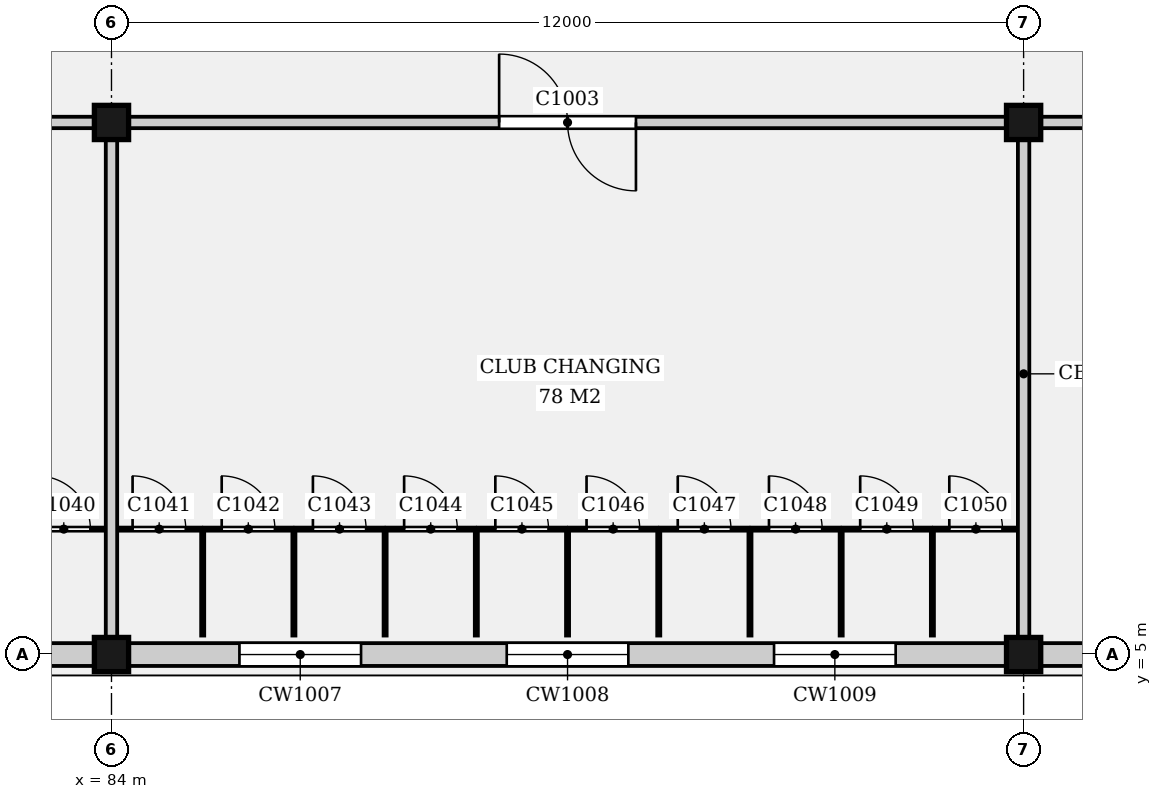
"""IFC4 building model, lengths in metres.
Left out: names, types, materials, properties, quantities, classifications, styles, units other than length and angle.
Written with IfcOpenShell. Run it as: python <this file> out.ifc"""

import sys

from ifc_helpers import new_model, si_unit, direction, frame, frame_2d, origin, origin_2d, place, context, subcontext, project, spatial, rectangle, extrude, element, fill, save


model = new_model("IFC4")
c1 = context("Model", 3, precision=1e-05, world=origin(), true_north=direction((0.0, 1.0)))
c2 = subcontext(c1, "Body", "Model", "MODEL_VIEW")
j1 = project(units=[si_unit("LENGTHUNIT", "METRE"), si_unit("PLANEANGLEUNIT", "RADIAN")], contexts=[c1])
p1 = place(None, origin())
s1 = spatial("IfcSite", under=j1, at=p1, CompositionType="ELEMENT")
p2 = place(p1, origin())
s2 = spatial("IfcBuilding", under=s1, at=p2, CompositionType="ELEMENT")
p3 = place(p2, frame((0.0, 0.0, 5.0)))
s3 = spatial("IfcBuildingStorey", under=s2, at=p3, CompositionType="ELEMENT", Elevation=5.0)
for number, where, z_axis, x_axis in (
    (1, (84.0, 5.0, 0.0), (0.0, 0.0, 1.0), (1.0, 0.0, 0.0)),
    (2, (84.0, 12.0, 0.0), (0.0, 0.0, 1.0), (1.0, 0.0, 0.0)),
    (3, (96.0, 5.0, 0.0), (0.0, 0.0, 1.0), (1.0, 0.0, 0.0)),
    (4, (96.0, 12.0, 0.0), (0.0, 0.0, 1.0), (1.0, 0.0, 0.0)),
):
    element("IfcColumn", number, at=place(p3, frame(where, z_axis=z_axis, x_axis=x_axis)), inside=s3, PredefinedType="COLUMN", context=c2, shape_type="SweptSolid", body=[
        extrude(rectangle(XDim=0.45, YDim=0.45, at=origin_2d()), origin(), (0.0, 0.0, 1.0), 4.4),
    ])
p4 = place(p3, frame((72.225, 5.0, 0.0), z_axis=(0.0, 0.0, 1.0), x_axis=(1.0, 0.0, 0.0)))
e5 = element("IfcWall", 5, at=p4, inside=s3, PredefinedType="ELEMENTEDWALL", context=c2, shape_type="SweptSolid", body=[
    extrude(rectangle(XDim=11.55, YDim=0.3, at=frame_2d((5.775, 0.0))), origin(), (0.0, 0.0, 1.0), 3.98),
])
p5 = place(p4, frame((1.458, 0.0, 1.4)))
e6 = element("IfcOpeningElement", 6, at=p5, cuts=e5, PredefinedType="OPENING", context=c2, shape_type="SweptSolid", body=[
    extrude(rectangle(XDim=1.6, YDim=1.2, at=frame_2d((0.8, 0.6))), frame((0.0, 0.16, 0.0), z_axis=(0.0, -1.0, 0.0), x_axis=(1.0, 0.0, 0.0)), (0.0, 0.0, 1.0), 0.32),
])
p6 = place(p4, frame((4.975, 0.0, 1.4)))
e7 = element("IfcOpeningElement", 7, at=p6, cuts=e5, PredefinedType="OPENING", context=c2, shape_type="SweptSolid", body=[
    extrude(rectangle(XDim=1.6, YDim=1.2, at=frame_2d((0.8, 0.6))), frame((0.0, 0.16, 0.0), z_axis=(0.0, -1.0, 0.0), x_axis=(1.0, 0.0, 0.0)), (0.0, 0.0, 1.0), 0.32),
])
p7 = place(p4, frame((8.492, 0.0, 1.4)))
e8 = element("IfcOpeningElement", 8, at=p7, cuts=e5, PredefinedType="OPENING", context=c2, shape_type="SweptSolid", body=[
    extrude(rectangle(XDim=1.6, YDim=1.2, at=frame_2d((0.8, 0.6))), frame((0.0, 0.16, 0.0), z_axis=(0.0, -1.0, 0.0), x_axis=(1.0, 0.0, 0.0)), (0.0, 0.0, 1.0), 0.32),
])
p8 = place(p3, frame((84.225, 5.0, 0.0), z_axis=(0.0, 0.0, 1.0), x_axis=(1.0, 0.0, 0.0)))
e9 = element("IfcWall", 9, at=p8, inside=s3, PredefinedType="ELEMENTEDWALL", context=c2, shape_type="SweptSolid", body=[
    extrude(rectangle(XDim=11.55, YDim=0.3, at=frame_2d((5.775, 0.0))), origin(), (0.0, 0.0, 1.0), 3.98),
])
p9 = place(p8, frame((1.458, 0.0, 1.4)))
e10 = element("IfcOpeningElement", 10, at=p9, cuts=e9, PredefinedType="OPENING", context=c2, shape_type="SweptSolid", body=[
    extrude(rectangle(XDim=1.6, YDim=1.2, at=frame_2d((0.8, 0.6))), frame((0.0, 0.16, 0.0), z_axis=(0.0, -1.0, 0.0), x_axis=(1.0, 0.0, 0.0)), (0.0, 0.0, 1.0), 0.32),
])
p10 = place(p8, frame((4.975, 0.0, 1.4)))
e11 = element("IfcOpeningElement", 11, at=p10, cuts=e9, PredefinedType="OPENING", context=c2, shape_type="SweptSolid", body=[
    extrude(rectangle(XDim=1.6, YDim=1.2, at=frame_2d((0.8, 0.6))), frame((0.0, 0.16, 0.0), z_axis=(0.0, -1.0, 0.0), x_axis=(1.0, 0.0, 0.0)), (0.0, 0.0, 1.0), 0.32),
])
p11 = place(p8, frame((8.492, 0.0, 1.4)))
e12 = element("IfcOpeningElement", 12, at=p11, cuts=e9, PredefinedType="OPENING", context=c2, shape_type="SweptSolid", body=[
    extrude(rectangle(XDim=1.6, YDim=1.2, at=frame_2d((0.8, 0.6))), frame((0.0, 0.16, 0.0), z_axis=(0.0, -1.0, 0.0), x_axis=(1.0, 0.0, 0.0)), (0.0, 0.0, 1.0), 0.32),
])
p12 = place(p3, frame((96.225, 5.0, 0.0), z_axis=(0.0, 0.0, 1.0), x_axis=(1.0, 0.0, 0.0)))
e13 = element("IfcWall", 13, at=p12, inside=s3, PredefinedType="ELEMENTEDWALL", context=c2, shape_type="SweptSolid", body=[
    extrude(rectangle(XDim=11.55, YDim=0.3, at=frame_2d((5.775, 0.0))), origin(), (0.0, 0.0, 1.0), 3.98),
])
p13 = place(p12, frame((1.458, 0.0, 1.4)))
e14 = element("IfcOpeningElement", 14, at=p13, cuts=e13, PredefinedType="OPENING", context=c2, shape_type="SweptSolid", body=[
    extrude(rectangle(XDim=1.6, YDim=1.2, at=frame_2d((0.8, 0.6))), frame((0.0, 0.16, 0.0), z_axis=(0.0, -1.0, 0.0), x_axis=(1.0, 0.0, 0.0)), (0.0, 0.0, 1.0), 0.32),
])
p14 = place(p12, frame((4.975, 0.0, 1.4)))
e15 = element("IfcOpeningElement", 15, at=p14, cuts=e13, PredefinedType="OPENING", context=c2, shape_type="SweptSolid", body=[
    extrude(rectangle(XDim=1.6, YDim=1.2, at=frame_2d((0.8, 0.6))), frame((0.0, 0.16, 0.0), z_axis=(0.0, -1.0, 0.0), x_axis=(1.0, 0.0, 0.0)), (0.0, 0.0, 1.0), 0.32),
])
p15 = place(p12, frame((8.492, 0.0, 1.4)))
e16 = element("IfcOpeningElement", 16, at=p15, cuts=e13, PredefinedType="OPENING", context=c2, shape_type="SweptSolid", body=[
    extrude(rectangle(XDim=1.6, YDim=1.2, at=frame_2d((0.8, 0.6))), frame((0.0, 0.16, 0.0), z_axis=(0.0, -1.0, 0.0), x_axis=(1.0, 0.0, 0.0)), (0.0, 0.0, 1.0), 0.32),
])
p16 = place(p3, frame((72.225, 12.0, 0.0), z_axis=(0.0, 0.0, 1.0), x_axis=(1.0, 0.0, 0.0)))
e17 = element("IfcWall", 17, at=p16, inside=s3, PredefinedType="PARTITIONING", context=c2, shape_type="SweptSolid", body=[
    extrude(rectangle(XDim=11.55, YDim=0.15, at=frame_2d((5.775, 0.0))), origin(), (0.0, 0.0, 1.0), 3.98),
])
p17 = place(p16, frame((4.875, 0.0, 0.0)))
e18 = element("IfcOpeningElement", 18, at=p17, cuts=e17, PredefinedType="OPENING", context=c2, shape_type="SweptSolid", body=[
    extrude(rectangle(XDim=1.8, YDim=2.4, at=frame_2d((0.9, 1.2))), frame((0.0, 0.085, 0.0), z_axis=(0.0, -1.0, 0.0), x_axis=(1.0, 0.0, 0.0)), (0.0, 0.0, 1.0), 0.17),
])
p18 = place(p3, frame((84.225, 12.0, 0.0), z_axis=(0.0, 0.0, 1.0), x_axis=(1.0, 0.0, 0.0)))
e19 = element("IfcWall", 19, at=p18, inside=s3, PredefinedType="PARTITIONING", context=c2, shape_type="SweptSolid", body=[
    extrude(rectangle(XDim=11.55, YDim=0.15, at=frame_2d((5.775, 0.0))), origin(), (0.0, 0.0, 1.0), 3.98),
])
p19 = place(p18, frame((4.875, 0.0, 0.0)))
e20 = element("IfcOpeningElement", 20, at=p19, cuts=e19, PredefinedType="OPENING", context=c2, shape_type="SweptSolid", body=[
    extrude(rectangle(XDim=1.8, YDim=2.4, at=frame_2d((0.9, 1.2))), frame((0.0, 0.085, 0.0), z_axis=(0.0, -1.0, 0.0), x_axis=(1.0, 0.0, 0.0)), (0.0, 0.0, 1.0), 0.17),
])
p20 = place(p3, frame((96.225, 12.0, 0.0), z_axis=(0.0, 0.0, 1.0), x_axis=(1.0, 0.0, 0.0)))
e21 = element("IfcWall", 21, at=p20, inside=s3, PredefinedType="PARTITIONING", context=c2, shape_type="SweptSolid", body=[
    extrude(rectangle(XDim=11.55, YDim=0.15, at=frame_2d((5.775, 0.0))), origin(), (0.0, 0.0, 1.0), 3.98),
])
p21 = place(p20, frame((5.275, 0.0, 0.0)))
e22 = element("IfcOpeningElement", 22, at=p21, cuts=e21, PredefinedType="OPENING", context=c2, shape_type="SweptSolid", body=[
    extrude(rectangle(XDim=1.0, YDim=2.1, at=frame_2d((0.5, 1.05))), frame((0.0, 0.085, 0.0), z_axis=(0.0, -1.0, 0.0), x_axis=(1.0, 0.0, 0.0)), (0.0, 0.0, 1.0), 0.17),
])
for number, where, z_axis, x_axis in (
    (23, (84.0, 5.225, 0.0), (0.0, 0.0, 1.0), (0.0, 1.0, 0.0)),
    (24, (96.0, 5.225, 0.0), (0.0, 0.0, 1.0), (0.0, 1.0, 0.0)),
):
    element("IfcWall", number, at=place(p3, frame(where, z_axis=z_axis, x_axis=x_axis)), inside=s3, PredefinedType="PARTITIONING", context=c2, shape_type="SweptSolid", body=[
        extrude(rectangle(XDim=6.55, YDim=0.15, at=frame_2d((3.275, 0.0))), origin(), (0.0, 0.0, 1.0), 3.98),
    ])
for number, where, z_axis, x_axis in (
    (25, (85.2, 5.25, 0.0), (0.0, 0.0, 1.0), (0.0, 1.0, 0.0)),
    (26, (86.4, 5.25, 0.0), (0.0, 0.0, 1.0), (0.0, 1.0, 0.0)),
    (27, (87.6, 5.25, 0.0), (0.0, 0.0, 1.0), (0.0, 1.0, 0.0)),
    (28, (88.8, 5.25, 0.0), (0.0, 0.0, 1.0), (0.0, 1.0, 0.0)),
    (29, (90.0, 5.25, 0.0), (0.0, 0.0, 1.0), (0.0, 1.0, 0.0)),
    (30, (91.2, 5.25, 0.0), (0.0, 0.0, 1.0), (0.0, 1.0, 0.0)),
    (31, (92.4, 5.25, 0.0), (0.0, 0.0, 1.0), (0.0, 1.0, 0.0)),
    (32, (93.6, 5.25, 0.0), (0.0, 0.0, 1.0), (0.0, 1.0, 0.0)),
    (33, (94.8, 5.25, 0.0), (0.0, 0.0, 1.0), (0.0, 1.0, 0.0)),
):
    element("IfcWall", number, at=place(p3, frame(where, z_axis=z_axis, x_axis=x_axis)), inside=s3, PredefinedType="PARTITIONING", context=c2, shape_type="SweptSolid", body=[
        extrude(rectangle(XDim=1.4, YDim=0.04, at=frame_2d((0.7, 0.0))), origin(), (0.0, 0.0, 1.0), 2.4),
    ])
p22 = place(p3, frame((82.82, 6.65, 0.0), z_axis=(0.0, 0.0, 1.0), x_axis=(1.0, 0.0, 0.0)))
e34 = element("IfcWall", 34, at=p22, inside=s3, PredefinedType="PARTITIONING", context=c2, shape_type="SweptSolid", body=[
    extrude(rectangle(XDim=1.105, YDim=0.04, at=frame_2d((0.552, 0.0))), origin(), (0.0, 0.0, 1.0), 2.4),
])
p23 = place(p22, frame((0.202, 0.0, 0.0)))
e35 = element("IfcOpeningElement", 35, at=p23, cuts=e34, PredefinedType="OPENING", context=c2, shape_type="SweptSolid", body=[
    extrude(rectangle(XDim=0.7, YDim=2.0, at=frame_2d((0.35, 1.0))), frame((0.0, 0.03, 0.0), z_axis=(0.0, -1.0, 0.0), x_axis=(1.0, 0.0, 0.0)), (0.0, 0.0, 1.0), 0.06),
])
p24 = place(p3, frame((84.075, 6.65, 0.0), z_axis=(0.0, 0.0, 1.0), x_axis=(1.0, 0.0, 0.0)))
e36 = element("IfcWall", 36, at=p24, inside=s3, PredefinedType="PARTITIONING", context=c2, shape_type="SweptSolid", body=[
    extrude(rectangle(XDim=1.105, YDim=0.04, at=frame_2d((0.552, 0.0))), origin(), (0.0, 0.0, 1.0), 2.4),
])
p25 = place(p24, frame((0.202, 0.0, 0.0)))
e37 = element("IfcOpeningElement", 37, at=p25, cuts=e36, PredefinedType="OPENING", context=c2, shape_type="SweptSolid", body=[
    extrude(rectangle(XDim=0.7, YDim=2.0, at=frame_2d((0.35, 1.0))), frame((0.0, 0.03, 0.0), z_axis=(0.0, -1.0, 0.0), x_axis=(1.0, 0.0, 0.0)), (0.0, 0.0, 1.0), 0.06),
])
p26 = place(p3, frame((85.22, 6.65, 0.0), z_axis=(0.0, 0.0, 1.0), x_axis=(1.0, 0.0, 0.0)))
e38 = element("IfcWall", 38, at=p26, inside=s3, PredefinedType="PARTITIONING", context=c2, shape_type="SweptSolid", body=[
    extrude(rectangle(XDim=1.16, YDim=0.04, at=frame_2d((0.58, 0.0))), origin(), (0.0, 0.0, 1.0), 2.4),
])
p27 = place(p26, frame((0.23, 0.0, 0.0)))
e39 = element("IfcOpeningElement", 39, at=p27, cuts=e38, PredefinedType="OPENING", context=c2, shape_type="SweptSolid", body=[
    extrude(rectangle(XDim=0.7, YDim=2.0, at=frame_2d((0.35, 1.0))), frame((0.0, 0.03, 0.0), z_axis=(0.0, -1.0, 0.0), x_axis=(1.0, 0.0, 0.0)), (0.0, 0.0, 1.0), 0.06),
])
p28 = place(p3, frame((86.42, 6.65, 0.0), z_axis=(0.0, 0.0, 1.0), x_axis=(1.0, 0.0, 0.0)))
e40 = element("IfcWall", 40, at=p28, inside=s3, PredefinedType="PARTITIONING", context=c2, shape_type="SweptSolid", body=[
    extrude(rectangle(XDim=1.16, YDim=0.04, at=frame_2d((0.58, 0.0))), origin(), (0.0, 0.0, 1.0), 2.4),
])
p29 = place(p28, frame((0.23, 0.0, 0.0)))
e41 = element("IfcOpeningElement", 41, at=p29, cuts=e40, PredefinedType="OPENING", context=c2, shape_type="SweptSolid", body=[
    extrude(rectangle(XDim=0.7, YDim=2.0, at=frame_2d((0.35, 1.0))), frame((0.0, 0.03, 0.0), z_axis=(0.0, -1.0, 0.0), x_axis=(1.0, 0.0, 0.0)), (0.0, 0.0, 1.0), 0.06),
])
p30 = place(p3, frame((87.62, 6.65, 0.0), z_axis=(0.0, 0.0, 1.0), x_axis=(1.0, 0.0, 0.0)))
e42 = element("IfcWall", 42, at=p30, inside=s3, PredefinedType="PARTITIONING", context=c2, shape_type="SweptSolid", body=[
    extrude(rectangle(XDim=1.16, YDim=0.04, at=frame_2d((0.58, 0.0))), origin(), (0.0, 0.0, 1.0), 2.4),
])
p31 = place(p30, frame((0.23, 0.0, 0.0)))
e43 = element("IfcOpeningElement", 43, at=p31, cuts=e42, PredefinedType="OPENING", context=c2, shape_type="SweptSolid", body=[
    extrude(rectangle(XDim=0.7, YDim=2.0, at=frame_2d((0.35, 1.0))), frame((0.0, 0.03, 0.0), z_axis=(0.0, -1.0, 0.0), x_axis=(1.0, 0.0, 0.0)), (0.0, 0.0, 1.0), 0.06),
])
p32 = place(p3, frame((88.82, 6.65, 0.0), z_axis=(0.0, 0.0, 1.0), x_axis=(1.0, 0.0, 0.0)))
e44 = element("IfcWall", 44, at=p32, inside=s3, PredefinedType="PARTITIONING", context=c2, shape_type="SweptSolid", body=[
    extrude(rectangle(XDim=1.16, YDim=0.04, at=frame_2d((0.58, 0.0))), origin(), (0.0, 0.0, 1.0), 2.4),
])
p33 = place(p32, frame((0.23, 0.0, 0.0)))
e45 = element("IfcOpeningElement", 45, at=p33, cuts=e44, PredefinedType="OPENING", context=c2, shape_type="SweptSolid", body=[
    extrude(rectangle(XDim=0.7, YDim=2.0, at=frame_2d((0.35, 1.0))), frame((0.0, 0.03, 0.0), z_axis=(0.0, -1.0, 0.0), x_axis=(1.0, 0.0, 0.0)), (0.0, 0.0, 1.0), 0.06),
])
p34 = place(p3, frame((90.02, 6.65, 0.0), z_axis=(0.0, 0.0, 1.0), x_axis=(1.0, 0.0, 0.0)))
e46 = element("IfcWall", 46, at=p34, inside=s3, PredefinedType="PARTITIONING", context=c2, shape_type="SweptSolid", body=[
    extrude(rectangle(XDim=1.16, YDim=0.04, at=frame_2d((0.58, 0.0))), origin(), (0.0, 0.0, 1.0), 2.4),
])
p35 = place(p34, frame((0.23, 0.0, 0.0)))
e47 = element("IfcOpeningElement", 47, at=p35, cuts=e46, PredefinedType="OPENING", context=c2, shape_type="SweptSolid", body=[
    extrude(rectangle(XDim=0.7, YDim=2.0, at=frame_2d((0.35, 1.0))), frame((0.0, 0.03, 0.0), z_axis=(0.0, -1.0, 0.0), x_axis=(1.0, 0.0, 0.0)), (0.0, 0.0, 1.0), 0.06),
])
p36 = place(p3, frame((91.22, 6.65, 0.0), z_axis=(0.0, 0.0, 1.0), x_axis=(1.0, 0.0, 0.0)))
e48 = element("IfcWall", 48, at=p36, inside=s3, PredefinedType="PARTITIONING", context=c2, shape_type="SweptSolid", body=[
    extrude(rectangle(XDim=1.16, YDim=0.04, at=frame_2d((0.58, 0.0))), origin(), (0.0, 0.0, 1.0), 2.4),
])
p37 = place(p36, frame((0.23, 0.0, 0.0)))
e49 = element("IfcOpeningElement", 49, at=p37, cuts=e48, PredefinedType="OPENING", context=c2, shape_type="SweptSolid", body=[
    extrude(rectangle(XDim=0.7, YDim=2.0, at=frame_2d((0.35, 1.0))), frame((0.0, 0.03, 0.0), z_axis=(0.0, -1.0, 0.0), x_axis=(1.0, 0.0, 0.0)), (0.0, 0.0, 1.0), 0.06),
])
p38 = place(p3, frame((92.42, 6.65, 0.0), z_axis=(0.0, 0.0, 1.0), x_axis=(1.0, 0.0, 0.0)))
e50 = element("IfcWall", 50, at=p38, inside=s3, PredefinedType="PARTITIONING", context=c2, shape_type="SweptSolid", body=[
    extrude(rectangle(XDim=1.16, YDim=0.04, at=frame_2d((0.58, 0.0))), origin(), (0.0, 0.0, 1.0), 2.4),
])
p39 = place(p38, frame((0.23, 0.0, 0.0)))
e51 = element("IfcOpeningElement", 51, at=p39, cuts=e50, PredefinedType="OPENING", context=c2, shape_type="SweptSolid", body=[
    extrude(rectangle(XDim=0.7, YDim=2.0, at=frame_2d((0.35, 1.0))), frame((0.0, 0.03, 0.0), z_axis=(0.0, -1.0, 0.0), x_axis=(1.0, 0.0, 0.0)), (0.0, 0.0, 1.0), 0.06),
])
p40 = place(p3, frame((93.62, 6.65, 0.0), z_axis=(0.0, 0.0, 1.0), x_axis=(1.0, 0.0, 0.0)))
e52 = element("IfcWall", 52, at=p40, inside=s3, PredefinedType="PARTITIONING", context=c2, shape_type="SweptSolid", body=[
    extrude(rectangle(XDim=1.16, YDim=0.04, at=frame_2d((0.58, 0.0))), origin(), (0.0, 0.0, 1.0), 2.4),
])
p41 = place(p40, frame((0.23, 0.0, 0.0)))
e53 = element("IfcOpeningElement", 53, at=p41, cuts=e52, PredefinedType="OPENING", context=c2, shape_type="SweptSolid", body=[
    extrude(rectangle(XDim=0.7, YDim=2.0, at=frame_2d((0.35, 1.0))), frame((0.0, 0.03, 0.0), z_axis=(0.0, -1.0, 0.0), x_axis=(1.0, 0.0, 0.0)), (0.0, 0.0, 1.0), 0.06),
])
p42 = place(p3, frame((94.82, 6.65, 0.0), z_axis=(0.0, 0.0, 1.0), x_axis=(1.0, 0.0, 0.0)))
e54 = element("IfcWall", 54, at=p42, inside=s3, PredefinedType="PARTITIONING", context=c2, shape_type="SweptSolid", body=[
    extrude(rectangle(XDim=1.105, YDim=0.04, at=frame_2d((0.552, 0.0))), origin(), (0.0, 0.0, 1.0), 2.4),
])
p43 = place(p42, frame((0.202, 0.0, 0.0)))
e55 = element("IfcOpeningElement", 55, at=p43, cuts=e54, PredefinedType="OPENING", context=c2, shape_type="SweptSolid", body=[
    extrude(rectangle(XDim=0.7, YDim=2.0, at=frame_2d((0.35, 1.0))), frame((0.0, 0.03, 0.0), z_axis=(0.0, -1.0, 0.0), x_axis=(1.0, 0.0, 0.0)), (0.0, 0.0, 1.0), 0.06),
])
p44 = place(p9, origin())
e56 = element("IfcWindow", 56, at=p44, inside=s3, PartitioningType="SINGLE_PANEL", PredefinedType="WINDOW", context=c2, shape_type="SweptSolid", body=[
    extrude(rectangle(XDim=1.6, YDim=1.2, at=frame_2d((0.8, 0.6))), frame((0.0, 0.03, 0.0), z_axis=(0.0, -1.0, 0.0), x_axis=(1.0, 0.0, 0.0)), (0.0, 0.0, 1.0), 0.06),
])
fill(e10, e56)
p45 = place(p10, origin())
e57 = element("IfcWindow", 57, at=p45, inside=s3, PartitioningType="SINGLE_PANEL", PredefinedType="WINDOW", context=c2, shape_type="SweptSolid", body=[
    extrude(rectangle(XDim=1.6, YDim=1.2, at=frame_2d((0.8, 0.6))), frame((0.0, 0.03, 0.0), z_axis=(0.0, -1.0, 0.0), x_axis=(1.0, 0.0, 0.0)), (0.0, 0.0, 1.0), 0.06),
])
fill(e11, e57)
p46 = place(p11, origin())
e58 = element("IfcWindow", 58, at=p46, inside=s3, PartitioningType="SINGLE_PANEL", PredefinedType="WINDOW", context=c2, shape_type="SweptSolid", body=[
    extrude(rectangle(XDim=1.6, YDim=1.2, at=frame_2d((0.8, 0.6))), frame((0.0, 0.03, 0.0), z_axis=(0.0, -1.0, 0.0), x_axis=(1.0, 0.0, 0.0)), (0.0, 0.0, 1.0), 0.06),
])
fill(e12, e58)
p47 = place(p19, origin())
e59 = element("IfcDoor", 59, at=p47, inside=s3, OperationType="DOUBLE_DOOR_SINGLE_SWING", PredefinedType="DOOR", context=c2, shape_type="SweptSolid", body=[
    extrude(rectangle(XDim=1.8, YDim=2.4, at=frame_2d((0.9, 1.2))), frame((0.0, 0.025, 0.0), z_axis=(0.0, -1.0, 0.0), x_axis=(1.0, 0.0, 0.0)), (0.0, 0.0, 1.0), 0.05),
])
fill(e20, e59)
p48 = place(p23, origin())
e60 = element("IfcDoor", 60, at=p48, inside=s3, OperationType="SINGLE_SWING_LEFT", PredefinedType="DOOR", context=c2, shape_type="SweptSolid", body=[
    extrude(rectangle(XDim=0.7, YDim=2.0, at=frame_2d((0.35, 1.0))), frame((0.0, 0.02, 0.0), z_axis=(0.0, -1.0, 0.0), x_axis=(1.0, 0.0, 0.0)), (0.0, 0.0, 1.0), 0.04),
])
fill(e35, e60)
p49 = place(p25, origin())
e61 = element("IfcDoor", 61, at=p49, inside=s3, OperationType="SINGLE_SWING_LEFT", PredefinedType="DOOR", context=c2, shape_type="SweptSolid", body=[
    extrude(rectangle(XDim=0.7, YDim=2.0, at=frame_2d((0.35, 1.0))), frame((0.0, 0.02, 0.0), z_axis=(0.0, -1.0, 0.0), x_axis=(1.0, 0.0, 0.0)), (0.0, 0.0, 1.0), 0.04),
])
fill(e37, e61)
p50 = place(p27, origin())
e62 = element("IfcDoor", 62, at=p50, inside=s3, OperationType="SINGLE_SWING_LEFT", PredefinedType="DOOR", context=c2, shape_type="SweptSolid", body=[
    extrude(rectangle(XDim=0.7, YDim=2.0, at=frame_2d((0.35, 1.0))), frame((0.0, 0.02, 0.0), z_axis=(0.0, -1.0, 0.0), x_axis=(1.0, 0.0, 0.0)), (0.0, 0.0, 1.0), 0.04),
])
fill(e39, e62)
p51 = place(p29, origin())
e63 = element("IfcDoor", 63, at=p51, inside=s3, OperationType="SINGLE_SWING_LEFT", PredefinedType="DOOR", context=c2, shape_type="SweptSolid", body=[
    extrude(rectangle(XDim=0.7, YDim=2.0, at=frame_2d((0.35, 1.0))), frame((0.0, 0.02, 0.0), z_axis=(0.0, -1.0, 0.0), x_axis=(1.0, 0.0, 0.0)), (0.0, 0.0, 1.0), 0.04),
])
fill(e41, e63)
p52 = place(p31, origin())
e64 = element("IfcDoor", 64, at=p52, inside=s3, OperationType="SINGLE_SWING_LEFT", PredefinedType="DOOR", context=c2, shape_type="SweptSolid", body=[
    extrude(rectangle(XDim=0.7, YDim=2.0, at=frame_2d((0.35, 1.0))), frame((0.0, 0.02, 0.0), z_axis=(0.0, -1.0, 0.0), x_axis=(1.0, 0.0, 0.0)), (0.0, 0.0, 1.0), 0.04),
])
fill(e43, e64)
p53 = place(p33, origin())
e65 = element("IfcDoor", 65, at=p53, inside=s3, OperationType="SINGLE_SWING_LEFT", PredefinedType="DOOR", context=c2, shape_type="SweptSolid", body=[
    extrude(rectangle(XDim=0.7, YDim=2.0, at=frame_2d((0.35, 1.0))), frame((0.0, 0.02, 0.0), z_axis=(0.0, -1.0, 0.0), x_axis=(1.0, 0.0, 0.0)), (0.0, 0.0, 1.0), 0.04),
])
fill(e45, e65)
p54 = place(p35, origin())
e66 = element("IfcDoor", 66, at=p54, inside=s3, OperationType="SINGLE_SWING_LEFT", PredefinedType="DOOR", context=c2, shape_type="SweptSolid", body=[
    extrude(rectangle(XDim=0.7, YDim=2.0, at=frame_2d((0.35, 1.0))), frame((0.0, 0.02, 0.0), z_axis=(0.0, -1.0, 0.0), x_axis=(1.0, 0.0, 0.0)), (0.0, 0.0, 1.0), 0.04),
])
fill(e47, e66)
p55 = place(p37, origin())
e67 = element("IfcDoor", 67, at=p55, inside=s3, OperationType="SINGLE_SWING_LEFT", PredefinedType="DOOR", context=c2, shape_type="SweptSolid", body=[
    extrude(rectangle(XDim=0.7, YDim=2.0, at=frame_2d((0.35, 1.0))), frame((0.0, 0.02, 0.0), z_axis=(0.0, -1.0, 0.0), x_axis=(1.0, 0.0, 0.0)), (0.0, 0.0, 1.0), 0.04),
])
fill(e49, e67)
p56 = place(p39, origin())
e68 = element("IfcDoor", 68, at=p56, inside=s3, OperationType="SINGLE_SWING_LEFT", PredefinedType="DOOR", context=c2, shape_type="SweptSolid", body=[
    extrude(rectangle(XDim=0.7, YDim=2.0, at=frame_2d((0.35, 1.0))), frame((0.0, 0.02, 0.0), z_axis=(0.0, -1.0, 0.0), x_axis=(1.0, 0.0, 0.0)), (0.0, 0.0, 1.0), 0.04),
])
fill(e51, e68)
p57 = place(p41, origin())
e69 = element("IfcDoor", 69, at=p57, inside=s3, OperationType="SINGLE_SWING_LEFT", PredefinedType="DOOR", context=c2, shape_type="SweptSolid", body=[
    extrude(rectangle(XDim=0.7, YDim=2.0, at=frame_2d((0.35, 1.0))), frame((0.0, 0.02, 0.0), z_axis=(0.0, -1.0, 0.0), x_axis=(1.0, 0.0, 0.0)), (0.0, 0.0, 1.0), 0.04),
])
fill(e53, e69)
p58 = place(p43, origin())
e70 = element("IfcDoor", 70, at=p58, inside=s3, OperationType="SINGLE_SWING_LEFT", PredefinedType="DOOR", context=c2, shape_type="SweptSolid", body=[
    extrude(rectangle(XDim=0.7, YDim=2.0, at=frame_2d((0.35, 1.0))), frame((0.0, 0.02, 0.0), z_axis=(0.0, -1.0, 0.0), x_axis=(1.0, 0.0, 0.0)), (0.0, 0.0, 1.0), 0.04),
])
fill(e55, e70)
save(model, sys.argv[1])
